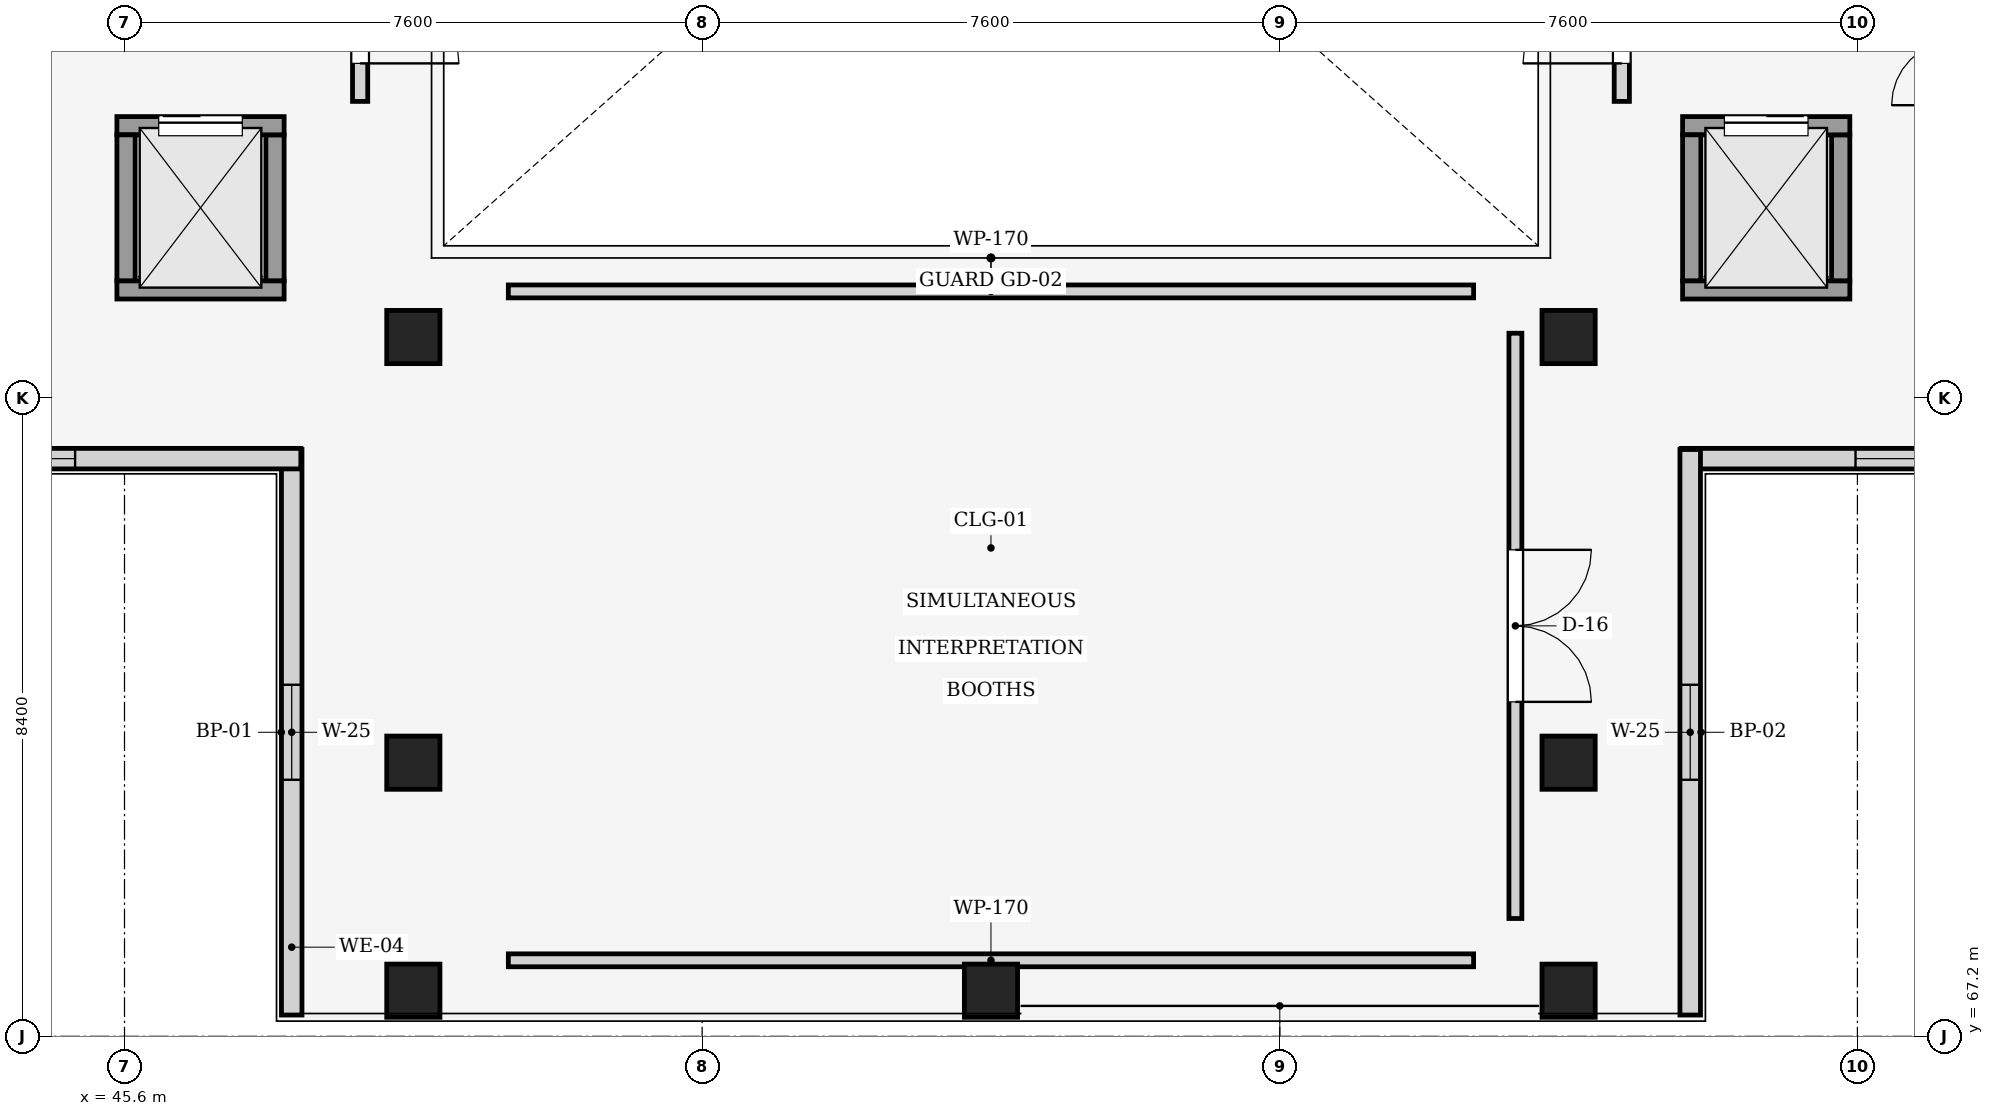
"""IFC4 building model, lengths in metres.
Left out: names, types, materials, properties, quantities, classifications, styles, units other than length and angle.
Written with IfcOpenShell. Run it as: python <this file> out.ifc"""

import sys

from ifc_helpers import new_model, si_unit, direction, frame, frame_2d, origin, origin_2d, place, context, subcontext, project, spatial, rectangle, extrude, element, fill, save


model = new_model("IFC4")
c1 = context("Model", 3, precision=1e-05, world=origin(), true_north=direction((0.0, 1.0)))
c2 = subcontext(c1, "Body", "Model", "MODEL_VIEW")
j1 = project(units=[si_unit("LENGTHUNIT", "METRE"), si_unit("PLANEANGLEUNIT", "RADIAN")], contexts=[c1])
p1 = place(None, origin())
s1 = spatial("IfcSite", under=j1, at=p1, CompositionType="ELEMENT")
p2 = place(p1, origin())
s2 = spatial("IfcBuilding", under=s1, at=p2, CompositionType="ELEMENT")
p3 = place(p2, frame((0.0, 0.0, 25.35)))
s3 = spatial("IfcBuildingStorey", under=s2, at=p3, CompositionType="ELEMENT", Elevation=25.35)
for number, where, z_axis, x_axis in (
    (1, (49.4, 70.8, 0.0), (0.0, 0.0, 1.0), (1.0, 0.0, 0.0)),
    (2, (49.4, 76.4, 0.0), (0.0, 0.0, 1.0), (1.0, 0.0, 0.0)),
    (3, (64.6, 70.8, 0.0), (0.0, 0.0, 1.0), (1.0, 0.0, 0.0)),
    (4, (64.6, 76.4, 0.0), (0.0, 0.0, 1.0), (1.0, 0.0, 0.0)),
):
    element("IfcColumn", number, at=place(p3, frame(where, z_axis=z_axis, x_axis=x_axis)), inside=s3, PredefinedType="COLUMN", context=c2, shape_type="SweptSolid", body=[
        extrude(rectangle(XDim=0.7, YDim=0.7, at=origin_2d()), origin(), (0.0, 0.0, 1.0), 4.05),
    ])
for number, where, z_axis, x_axis in (
    (5, (49.4, 67.8, 0.0), (0.0, 0.0, 1.0), (1.0, 0.0, 0.0)),
    (6, (57.0, 67.8, 0.0), (0.0, 0.0, 1.0), (1.0, 0.0, 0.0)),
    (7, (64.6, 67.8, 0.0), (0.0, 0.0, 1.0), (1.0, 0.0, 0.0)),
):
    element("IfcColumn", number, at=place(p3, frame(where, z_axis=z_axis, x_axis=x_axis)), inside=s3, PredefinedType="COLUMN", context=c2, shape_type="SweptSolid", body=[
        extrude(rectangle(XDim=0.7, YDim=0.7, at=origin_2d()), origin(), (0.0, 0.0, 1.0), 5.85),
    ])
p4 = place(p3, frame((47.8, 67.48, 0.0), z_axis=(0.0, 0.0, 1.0), x_axis=(0.0, 1.0, 0.0)))
e8 = element("IfcWall", 8, at=p4, inside=s3, PredefinedType="STANDARD", context=c2, shape_type="SweptSolid", body=[
    extrude(rectangle(XDim=7.44, YDim=0.27, at=frame_2d((3.72, 0.0))), origin(), (0.0, 0.0, 1.0), 3.025),
])
p5 = place(p4, frame((3.095, 0.0, 0.85)))
e9 = element("IfcOpeningElement", 9, at=p5, cuts=e8, PredefinedType="OPENING", context=c2, shape_type="SweptSolid", body=[
    extrude(rectangle(XDim=1.25, YDim=1.85, at=frame_2d((0.625, 0.925))), frame((0.0, 0.145, 0.0), z_axis=(0.0, -1.0, 0.0), x_axis=(1.0, 0.0, 0.0)), (0.0, 0.0, 1.0), 0.29),
])
p6 = place(p3, frame((47.92, 74.8, 0.0), z_axis=(0.0, 0.0, 1.0), x_axis=(-1.0, 0.0, 0.0)))
e10 = element("IfcWall", 10, at=p6, inside=s3, PredefinedType="STANDARD", context=c2, shape_type="SweptSolid", body=[
    extrude(rectangle(XDim=7.44, YDim=0.27, at=frame_2d((3.72, 0.0))), origin(), (0.0, 0.0, 1.0), 3.7),
])
p7 = place(p6, frame((2.97, 0.0, 0.85)))
e11 = element("IfcOpeningElement", 11, at=p7, cuts=e10, PredefinedType="OPENING", context=c2, shape_type="SweptSolid", body=[
    extrude(rectangle(XDim=1.5, YDim=1.85, at=frame_2d((0.75, 0.925))), frame((0.0, 0.145, 0.0), z_axis=(0.0, -1.0, 0.0), x_axis=(1.0, 0.0, 0.0)), (0.0, 0.0, 1.0), 0.29),
])
p8 = place(p3, frame((73.52, 74.8, 0.0), z_axis=(0.0, 0.0, 1.0), x_axis=(-1.0, 0.0, 0.0)))
e12 = element("IfcWall", 12, at=p8, inside=s3, PredefinedType="STANDARD", context=c2, shape_type="SweptSolid", body=[
    extrude(rectangle(XDim=7.44, YDim=0.27, at=frame_2d((3.72, 0.0))), origin(), (0.0, 0.0, 1.0), 3.7),
])
p9 = place(p8, frame((2.295, 0.0, 0.85)))
e13 = element("IfcOpeningElement", 13, at=p9, cuts=e12, PredefinedType="OPENING", context=c2, shape_type="SweptSolid", body=[
    extrude(rectangle(XDim=2.85, YDim=1.65, at=frame_2d((1.425, 0.825))), frame((0.0, 0.145, 0.0), z_axis=(0.0, -1.0, 0.0), x_axis=(1.0, 0.0, 0.0)), (0.0, 0.0, 1.0), 0.29),
])
p10 = place(p3, frame((66.2, 74.92, 0.0), z_axis=(0.0, 0.0, 1.0), x_axis=(0.0, -1.0, 0.0)))
e14 = element("IfcWall", 14, at=p10, inside=s3, PredefinedType="STANDARD", context=c2, shape_type="SweptSolid", body=[
    extrude(rectangle(XDim=7.44, YDim=0.27, at=frame_2d((3.72, 0.0))), origin(), (0.0, 0.0, 1.0), 3.025),
])
p11 = place(p10, frame((3.095, 0.0, 0.85)))
e15 = element("IfcOpeningElement", 15, at=p11, cuts=e14, PredefinedType="OPENING", context=c2, shape_type="SweptSolid", body=[
    extrude(rectangle(XDim=1.25, YDim=1.85, at=frame_2d((0.625, 0.925))), frame((0.0, 0.145, 0.0), z_axis=(0.0, -1.0, 0.0), x_axis=(1.0, 0.0, 0.0)), (0.0, 0.0, 1.0), 0.29),
])
p12 = place(p3, frame((47.7, 77.02, 0.0), z_axis=(0.0, 0.0, 1.0), x_axis=(-1.0, 0.0, 0.0)))
e16 = element("IfcWall", 16, at=p12, inside=s3, PredefinedType="SHEAR", context=c2, shape_type="SweptSolid", body=[
    extrude(rectangle(XDim=2.2, YDim=0.24, at=frame_2d((1.1, 0.0))), origin(), (0.0, 0.0, 1.0), 4.05),
])
p13 = place(p3, frame((47.58, 79.06, 0.0), z_axis=(0.0, 0.0, 1.0), x_axis=(0.0, -1.0, 0.0)))
e17 = element("IfcWall", 17, at=p13, inside=s3, PredefinedType="SHEAR", context=c2, shape_type="SweptSolid", body=[
    extrude(rectangle(XDim=1.92, YDim=0.24, at=frame_2d((0.96, 0.0))), origin(), (0.0, 0.0, 1.0), 4.05),
])
p14 = place(p3, frame((45.5, 79.18, 0.0), z_axis=(0.0, 0.0, 1.0), x_axis=(1.0, 0.0, 0.0)))
e18 = element("IfcWall", 18, at=p14, inside=s3, PredefinedType="SHEAR", context=c2, shape_type="SweptSolid", body=[
    extrude(rectangle(XDim=2.2, YDim=0.24, at=frame_2d((1.1, 0.0))), origin(), (0.0, 0.0, 1.0), 4.05),
])
p15 = place(p14, frame((0.55, 0.0, 0.0)))
e19 = element("IfcOpeningElement", 19, at=p15, cuts=e18, PredefinedType="OPENING", context=c2, shape_type="SweptSolid", body=[
    extrude(rectangle(XDim=1.1, YDim=2.15, at=frame_2d((0.55, 1.075))), frame((0.0, 0.13, 0.0), z_axis=(0.0, -1.0, 0.0), x_axis=(1.0, 0.0, 0.0)), (0.0, 0.0, 1.0), 0.26),
])
p16 = place(p3, frame((45.62, 77.14, 0.0), z_axis=(0.0, 0.0, 1.0), x_axis=(0.0, 1.0, 0.0)))
e20 = element("IfcWall", 20, at=p16, inside=s3, PredefinedType="SHEAR", context=c2, shape_type="SweptSolid", body=[
    extrude(rectangle(XDim=1.92, YDim=0.24, at=frame_2d((0.96, 0.0))), origin(), (0.0, 0.0, 1.0), 4.05),
])
p17 = place(p3, frame((48.7, 81.8, 0.0), z_axis=(0.0, 0.0, 1.0), x_axis=(0.0, -1.0, 0.0)))
e21 = element("IfcWall", 21, at=p17, inside=s3, PredefinedType="PARTITIONING", context=c2, shape_type="SweptSolid", body=[
    extrude(rectangle(XDim=2.3, YDim=0.2, at=frame_2d((1.15, 0.0))), origin(), (0.0, 0.0, 1.0), 2.9),
])
p18 = place(p17, frame((0.5, 0.0, 0.0)))
e22 = element("IfcOpeningElement", 22, at=p18, cuts=e21, PredefinedType="OPENING", context=c2, shape_type="SweptSolid", body=[
    extrude(rectangle(XDim=1.3, YDim=2.2, at=frame_2d((0.65, 1.1))), frame((0.0, 0.11, 0.0), z_axis=(0.0, -1.0, 0.0), x_axis=(1.0, 0.0, 0.0)), (0.0, 0.0, 1.0), 0.22),
])
p19 = place(p3, frame((68.3, 77.02, 0.0), z_axis=(0.0, 0.0, 1.0), x_axis=(-1.0, 0.0, 0.0)))
e23 = element("IfcWall", 23, at=p19, inside=s3, PredefinedType="SHEAR", context=c2, shape_type="SweptSolid", body=[
    extrude(rectangle(XDim=2.2, YDim=0.24, at=frame_2d((1.1, 0.0))), origin(), (0.0, 0.0, 1.0), 4.05),
])
p20 = place(p3, frame((68.18, 79.06, 0.0), z_axis=(0.0, 0.0, 1.0), x_axis=(0.0, -1.0, 0.0)))
e24 = element("IfcWall", 24, at=p20, inside=s3, PredefinedType="SHEAR", context=c2, shape_type="SweptSolid", body=[
    extrude(rectangle(XDim=1.92, YDim=0.24, at=frame_2d((0.96, 0.0))), origin(), (0.0, 0.0, 1.0), 4.05),
])
p21 = place(p3, frame((66.1, 79.18, 0.0), z_axis=(0.0, 0.0, 1.0), x_axis=(1.0, 0.0, 0.0)))
e25 = element("IfcWall", 25, at=p21, inside=s3, PredefinedType="SHEAR", context=c2, shape_type="SweptSolid", body=[
    extrude(rectangle(XDim=2.2, YDim=0.24, at=frame_2d((1.1, 0.0))), origin(), (0.0, 0.0, 1.0), 4.05),
])
p22 = place(p21, frame((0.55, 0.0, 0.0)))
e26 = element("IfcOpeningElement", 26, at=p22, cuts=e25, PredefinedType="OPENING", context=c2, shape_type="SweptSolid", body=[
    extrude(rectangle(XDim=1.1, YDim=2.15, at=frame_2d((0.55, 1.075))), frame((0.0, 0.13, 0.0), z_axis=(0.0, -1.0, 0.0), x_axis=(1.0, 0.0, 0.0)), (0.0, 0.0, 1.0), 0.26),
])
p23 = place(p3, frame((66.22, 77.14, 0.0), z_axis=(0.0, 0.0, 1.0), x_axis=(0.0, 1.0, 0.0)))
e27 = element("IfcWall", 27, at=p23, inside=s3, PredefinedType="SHEAR", context=c2, shape_type="SweptSolid", body=[
    extrude(rectangle(XDim=1.92, YDim=0.24, at=frame_2d((0.96, 0.0))), origin(), (0.0, 0.0, 1.0), 4.05),
])
p24 = place(p3, frame((65.3, 79.5, 0.0), z_axis=(0.0, 0.0, 1.0), x_axis=(0.0, 1.0, 0.0)))
e28 = element("IfcWall", 28, at=p24, inside=s3, PredefinedType="PARTITIONING", context=c2, shape_type="SweptSolid", body=[
    extrude(rectangle(XDim=2.3, YDim=0.2, at=frame_2d((1.15, 0.0))), origin(), (0.0, 0.0, 1.0), 2.9),
])
p25 = place(p24, frame((0.5, 0.0, 0.0)))
e29 = element("IfcOpeningElement", 29, at=p25, cuts=e28, PredefinedType="OPENING", context=c2, shape_type="SweptSolid", body=[
    extrude(rectangle(XDim=1.3, YDim=2.2, at=frame_2d((0.65, 1.1))), frame((0.0, 0.11, 0.0), z_axis=(0.0, -1.0, 0.0), x_axis=(1.0, 0.0, 0.0)), (0.0, 0.0, 1.0), 0.22),
])
p26 = place(p3, frame((50.65, 77.0, 0.0), z_axis=(0.0, 0.0, 1.0), x_axis=(1.0, 0.0, 0.0)))
e30 = element("IfcWall", 30, at=p26, inside=s3, PredefinedType="PARTITIONING", context=c2, shape_type="SweptSolid", body=[
    extrude(rectangle(XDim=12.7, YDim=0.17, at=frame_2d((6.35, 0.0))), origin(), (0.0, 0.0, 1.0), 3.71),
])
p27 = place(p3, frame((63.35, 68.2, 0.0), z_axis=(0.0, 0.0, 1.0), x_axis=(-1.0, 0.0, 0.0)))
e31 = element("IfcWall", 31, at=p27, inside=s3, PredefinedType="PARTITIONING", context=c2, shape_type="SweptSolid", body=[
    extrude(rectangle(XDim=12.7, YDim=0.17, at=frame_2d((6.35, 0.0))), origin(), (0.0, 0.0, 1.0), 3.175),
])
p28 = place(p3, frame((63.9, 76.45, 0.0), z_axis=(0.0, 0.0, 1.0), x_axis=(0.0, -1.0, 0.0)))
e32 = element("IfcWall", 32, at=p28, inside=s3, PredefinedType="PARTITIONING", context=c2, shape_type="SweptSolid", body=[
    extrude(rectangle(XDim=7.7, YDim=0.17, at=frame_2d((3.85, 0.0))), origin(), (0.0, 0.0, 1.0), 3.125),
])
p29 = place(p28, frame((2.85, 0.0, 0.0)))
e33 = element("IfcOpeningElement", 33, at=p29, cuts=e32, PredefinedType="OPENING", context=c2, shape_type="SweptSolid", body=[
    extrude(rectangle(XDim=2.0, YDim=2.22, at=frame_2d((1.0, 1.11))), frame((0.0, 0.095, 0.0), z_axis=(0.0, -1.0, 0.0), x_axis=(1.0, 0.0, 0.0)), (0.0, 0.0, 1.0), 0.19),
])
p30 = place(p5, origin())
e34 = element("IfcWindow", 34, at=p30, inside=s3, PartitioningType="SINGLE_PANEL", PredefinedType="WINDOW", context=c2, shape_type="SweptSolid", body=[
    extrude(rectangle(XDim=1.25, YDim=1.85, at=frame_2d((0.625, 0.925))), frame((0.0, 0.03, 0.0), z_axis=(0.0, -1.0, 0.0), x_axis=(1.0, 0.0, 0.0)), (0.0, 0.0, 1.0), 0.06),
])
fill(e9, e34)
p31 = place(p7, origin())
e35 = element("IfcWindow", 35, at=p31, inside=s3, PartitioningType="SINGLE_PANEL", PredefinedType="WINDOW", context=c2, shape_type="SweptSolid", body=[
    extrude(rectangle(XDim=1.5, YDim=1.85, at=frame_2d((0.75, 0.925))), frame((0.0, 0.03, 0.0), z_axis=(0.0, -1.0, 0.0), x_axis=(1.0, 0.0, 0.0)), (0.0, 0.0, 1.0), 0.06),
])
fill(e11, e35)
p32 = place(p9, origin())
e36 = element("IfcWindow", 36, at=p32, inside=s3, PartitioningType="SINGLE_PANEL", PredefinedType="WINDOW", context=c2, shape_type="SweptSolid", body=[
    extrude(rectangle(XDim=2.85, YDim=1.65, at=frame_2d((1.425, 0.825))), frame((0.0, 0.03, 0.0), z_axis=(0.0, -1.0, 0.0), x_axis=(1.0, 0.0, 0.0)), (0.0, 0.0, 1.0), 0.06),
])
fill(e13, e36)
p33 = place(p11, origin())
e37 = element("IfcWindow", 37, at=p33, inside=s3, PartitioningType="SINGLE_PANEL", PredefinedType="WINDOW", context=c2, shape_type="SweptSolid", body=[
    extrude(rectangle(XDim=1.25, YDim=1.85, at=frame_2d((0.625, 0.925))), frame((0.0, 0.03, 0.0), z_axis=(0.0, -1.0, 0.0), x_axis=(1.0, 0.0, 0.0)), (0.0, 0.0, 1.0), 0.06),
])
fill(e15, e37)
p34 = place(p15, origin())
e38 = element("IfcDoor", 38, at=p34, inside=s3, OperationType="SLIDING_TO_LEFT", PredefinedType="DOOR", context=c2, shape_type="SweptSolid", body=[
    extrude(rectangle(XDim=1.1, YDim=2.15, at=frame_2d((0.55, 1.075))), frame((0.0, 0.025, 0.0), z_axis=(0.0, -1.0, 0.0), x_axis=(1.0, 0.0, 0.0)), (0.0, 0.0, 1.0), 0.05),
])
fill(e19, e38)
p35 = place(p18, origin())
e39 = element("IfcDoor", 39, at=p35, inside=s3, OperationType="SINGLE_SWING_RIGHT", PredefinedType="DOOR", context=c2, shape_type="SweptSolid", body=[
    extrude(rectangle(XDim=1.3, YDim=2.2, at=frame_2d((0.65, 1.1))), frame((0.0, 0.025, 0.0), z_axis=(0.0, -1.0, 0.0), x_axis=(1.0, 0.0, 0.0)), (0.0, 0.0, 1.0), 0.05),
])
fill(e22, e39)
p36 = place(p22, origin())
e40 = element("IfcDoor", 40, at=p36, inside=s3, OperationType="SLIDING_TO_RIGHT", PredefinedType="DOOR", context=c2, shape_type="SweptSolid", body=[
    extrude(rectangle(XDim=1.1, YDim=2.15, at=frame_2d((0.55, 1.075))), frame((0.0, 0.025, 0.0), z_axis=(0.0, -1.0, 0.0), x_axis=(1.0, 0.0, 0.0)), (0.0, 0.0, 1.0), 0.05),
])
fill(e26, e40)
p37 = place(p25, origin())
e41 = element("IfcDoor", 41, at=p37, inside=s3, OperationType="SINGLE_SWING_LEFT", PredefinedType="DOOR", context=c2, shape_type="SweptSolid", body=[
    extrude(rectangle(XDim=1.3, YDim=2.2, at=frame_2d((0.65, 1.1))), frame((0.0, 0.025, 0.0), z_axis=(0.0, -1.0, 0.0), x_axis=(1.0, 0.0, 0.0)), (0.0, 0.0, 1.0), 0.05),
])
fill(e29, e41)
p38 = place(p29, origin())
e42 = element("IfcDoor", 42, at=p38, inside=s3, OperationType="DOUBLE_DOOR_SINGLE_SWING", PredefinedType="DOOR", context=c2, shape_type="SweptSolid", body=[
    extrude(rectangle(XDim=2.0, YDim=2.22, at=frame_2d((1.0, 1.11))), frame((0.0, 0.025, 0.0), z_axis=(0.0, -1.0, 0.0), x_axis=(1.0, 0.0, 0.0)), (0.0, 0.0, 1.0), 0.05),
])
fill(e33, e42)
save(model, sys.argv[1])
